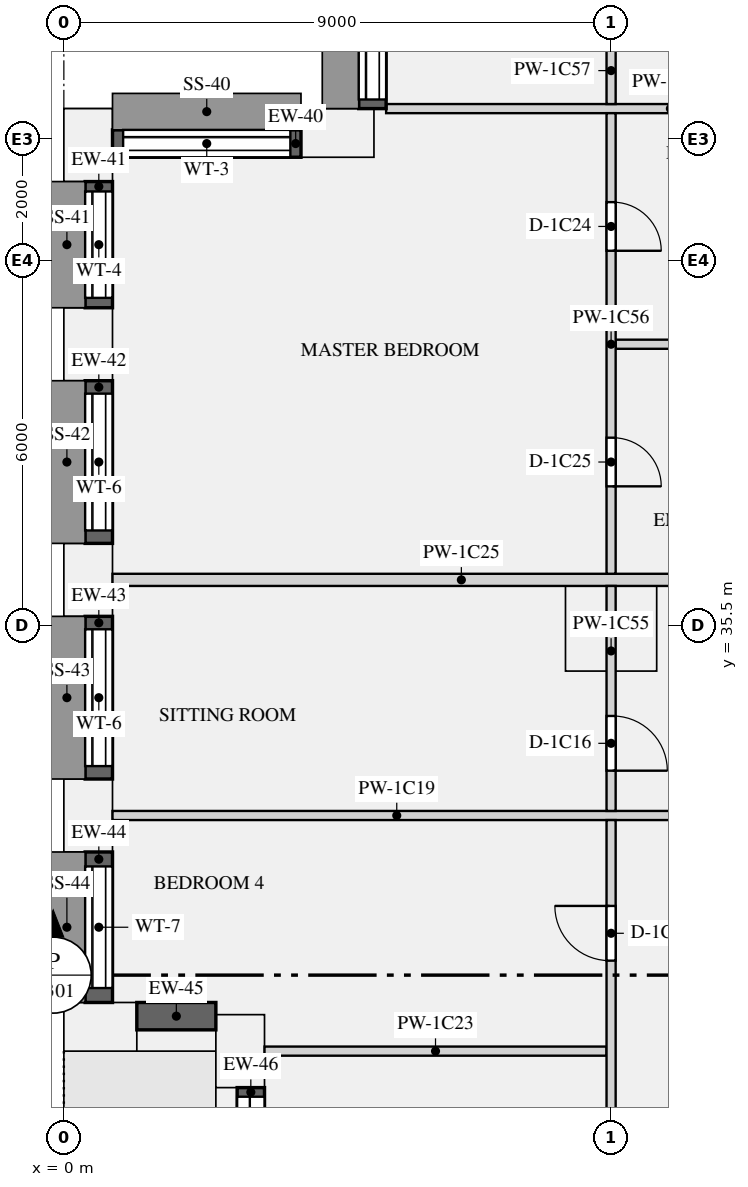
"""IFC4 building model, lengths in metres.
Left out: names, types, materials, properties, quantities, classifications, styles, units other than length and angle.
Written with IfcOpenShell. Run it as: python <this file> out.ifc"""

import sys

from ifc_helpers import new_model, si_unit, direction, frame, frame_2d, origin, origin_2d, place, context, subcontext, project, spatial, rectangle, extrude, element, fill, save


model = new_model("IFC4")
c1 = context("Model", 3, precision=1e-05, world=origin(), true_north=direction((0.0, 1.0)))
c2 = subcontext(c1, "Body", "Model", "MODEL_VIEW")
j1 = project(units=[si_unit("LENGTHUNIT", "METRE"), si_unit("PLANEANGLEUNIT", "RADIAN")], contexts=[c1])
p1 = place(None, origin())
s1 = spatial("IfcSite", under=j1, at=p1, CompositionType="ELEMENT")
p2 = place(p1, origin())
s2 = spatial("IfcBuilding", under=s1, at=p2, CompositionType="ELEMENT")
p3 = place(p2, frame((0.0, 0.0, 38.4)))
s3 = spatial("IfcBuildingStorey", under=s2, at=p3, CompositionType="ELEMENT", Elevation=38.4)
for number, where, z_axis, x_axis in (
    (1, (4.5, 43.6, 0.0), (0.0, 0.0, 1.0), (-1.0, 0.0, 0.0)),
    (2, (0.4, 43.4, 0.0), (0.0, 0.0, 1.0), (0.0, -1.0, 0.0)),
    (3, (0.4, 40.125, 0.0), (0.0, 0.0, 1.0), (0.0, -1.0, 0.0)),
    (4, (0.4, 36.25, 0.0), (0.0, 0.0, 1.0), (0.0, -1.0, 0.0)),
    (5, (0.4, 32.375, 0.0), (0.0, 0.0, 1.0), (0.0, -1.0, 0.0)),
    (6, (0.6, 28.9, 0.0), (0.0, 0.0, 1.0), (1.0, 0.0, 0.0)),
    (7, (2.9, 28.5, 0.0), (0.0, 0.0, 1.0), (0.0, -1.0, 0.0)),
):
    element("IfcColumn", number, at=place(p3, frame(where, z_axis=z_axis, x_axis=x_axis)), inside=s3, PredefinedType="USERDEFINED", context=c2, shape_type="SweptSolid", body=[
        extrude(rectangle(XDim=1.2, YDim=0.8, at=origin_2d()), origin(), (0.0, 0.0, 1.0), 3.15),
    ])
p4 = place(p3, frame((9.0, 35.5, 0.0), z_axis=(0.0, 0.0, 1.0), x_axis=(1.0, 0.0, 0.0)))
e8 = element("IfcColumn", 8, at=p4, inside=s3, PredefinedType="COLUMN", context=c2, shape_type="SweptSolid", body=[
    extrude(rectangle(XDim=1.5, YDim=1.5, at=origin_2d()), origin(), (0.0, 0.0, 1.0), 3.15),
])
p5 = place(p3, frame((5.075, 47.3, 0.9), z_axis=(0.0, 0.0, 1.0), x_axis=(0.0, -1.0, 0.0)))
e9 = element("IfcWall", 9, at=p5, inside=s3, PredefinedType="SOLIDWALL", context=c2, shape_type="SweptSolid", body=[
    extrude(rectangle(XDim=3.3, YDim=0.45, at=frame_2d((1.65, 0.0))), origin(), (0.0, 0.0, 1.0), 1.93),
])
p6 = place(p5, frame((0.15, 0.0, 0.15)))
e10 = element("IfcOpeningElement", 10, at=p6, cuts=e9, PredefinedType="OPENING", context=c2, shape_type="SweptSolid", body=[
    extrude(rectangle(XDim=3.0, YDim=1.5, at=frame_2d((1.5, 0.75))), frame((0.0, 0.235, 0.0), z_axis=(0.0, -1.0, 0.0), x_axis=(1.0, 0.0, 0.0)), (0.0, 0.0, 1.0), 0.47),
])
p7 = place(p3, frame((3.9, 43.425, 0.9), z_axis=(0.0, 0.0, 1.0), x_axis=(-1.0, 0.0, 0.0)))
e11 = element("IfcWall", 11, at=p7, inside=s3, PredefinedType="SOLIDWALL", context=c2, shape_type="SweptSolid", body=[
    extrude(rectangle(XDim=3.1, YDim=0.45, at=frame_2d((1.55, 0.0))), origin(), (0.0, 0.0, 1.0), 1.93),
])
p8 = place(p7, frame((0.175, 0.0, 0.15)))
e12 = element("IfcOpeningElement", 12, at=p8, cuts=e11, PredefinedType="OPENING", context=c2, shape_type="SweptSolid", body=[
    extrude(rectangle(XDim=2.75, YDim=1.5, at=frame_2d((1.375, 0.75))), frame((0.0, 0.235, 0.0), z_axis=(0.0, -1.0, 0.0), x_axis=(1.0, 0.0, 0.0)), (0.0, 0.0, 1.0), 0.47),
])
p9 = place(p3, frame((0.575, 42.8, 0.9), z_axis=(0.0, 0.0, 1.0), x_axis=(0.0, -1.0, 0.0)))
e13 = element("IfcWall", 13, at=p9, inside=s3, PredefinedType="SOLIDWALL", context=c2, shape_type="SweptSolid", body=[
    extrude(rectangle(XDim=2.075, YDim=0.45, at=frame_2d((1.038, 0.0))), origin(), (0.0, 0.0, 1.0), 1.93),
])
p10 = place(p9, frame((0.163, 0.0, 0.15)))
e14 = element("IfcOpeningElement", 14, at=p10, cuts=e13, PredefinedType="OPENING", context=c2, shape_type="SweptSolid", body=[
    extrude(rectangle(XDim=1.75, YDim=1.5, at=frame_2d((0.875, 0.75))), frame((0.0, 0.235, 0.0), z_axis=(0.0, -1.0, 0.0), x_axis=(1.0, 0.0, 0.0)), (0.0, 0.0, 1.0), 0.47),
])
p11 = place(p3, frame((0.575, 39.525, 0.9), z_axis=(0.0, 0.0, 1.0), x_axis=(0.0, -1.0, 0.0)))
e15 = element("IfcWall", 15, at=p11, inside=s3, PredefinedType="SOLIDWALL", context=c2, shape_type="SweptSolid", body=[
    extrude(rectangle(XDim=2.675, YDim=0.45, at=frame_2d((1.337, 0.0))), origin(), (0.0, 0.0, 1.0), 1.93),
])
p12 = place(p11, frame((0.212, 0.0, 0.15)))
e16 = element("IfcOpeningElement", 16, at=p12, cuts=e15, PredefinedType="OPENING", context=c2, shape_type="SweptSolid", body=[
    extrude(rectangle(XDim=2.25, YDim=1.5, at=frame_2d((1.125, 0.75))), frame((0.0, 0.235, 0.0), z_axis=(0.0, -1.0, 0.0), x_axis=(1.0, 0.0, 0.0)), (0.0, 0.0, 1.0), 0.47),
])
p13 = place(p3, frame((0.575, 35.65, 0.9), z_axis=(0.0, 0.0, 1.0), x_axis=(0.0, -1.0, 0.0)))
e17 = element("IfcWall", 17, at=p13, inside=s3, PredefinedType="SOLIDWALL", context=c2, shape_type="SweptSolid", body=[
    extrude(rectangle(XDim=2.675, YDim=0.45, at=frame_2d((1.337, 0.0))), origin(), (0.0, 0.0, 1.0), 1.93),
])
p14 = place(p13, frame((0.212, 0.0, 0.15)))
e18 = element("IfcOpeningElement", 18, at=p14, cuts=e17, PredefinedType="OPENING", context=c2, shape_type="SweptSolid", body=[
    extrude(rectangle(XDim=2.25, YDim=1.5, at=frame_2d((1.125, 0.75))), frame((0.0, 0.235, 0.0), z_axis=(0.0, -1.0, 0.0), x_axis=(1.0, 0.0, 0.0)), (0.0, 0.0, 1.0), 0.47),
])
p15 = place(p3, frame((0.575, 31.775, 0.9), z_axis=(0.0, 0.0, 1.0), x_axis=(0.0, -1.0, 0.0)))
e19 = element("IfcWall", 19, at=p15, inside=s3, PredefinedType="SOLIDWALL", context=c2, shape_type="SweptSolid", body=[
    extrude(rectangle(XDim=2.475, YDim=0.45, at=frame_2d((1.237, 0.0))), origin(), (0.0, 0.0, 1.0), 1.93),
])
p16 = place(p15, frame((0.238, 0.0, 0.15)))
e20 = element("IfcOpeningElement", 20, at=p16, cuts=e19, PredefinedType="OPENING", context=c2, shape_type="SweptSolid", body=[
    extrude(rectangle(XDim=2.0, YDim=1.5, at=frame_2d((1.0, 0.75))), frame((0.0, 0.235, 0.0), z_axis=(0.0, -1.0, 0.0), x_axis=(1.0, 0.0, 0.0)), (0.0, 0.0, 1.0), 0.47),
])
p17 = place(p3, frame((1.2, 29.075, 0.9), z_axis=(0.0, 0.0, 1.0), x_axis=(1.0, 0.0, 0.0)))
e21 = element("IfcWall", 21, at=p17, inside=s3, PredefinedType="SOLIDWALL", context=c2, shape_type="SweptSolid", body=[
    extrude(rectangle(XDim=1.3, YDim=0.45, at=frame_2d((0.65, 0.0))), origin(), (0.0, 0.0, 1.0), 1.93),
])
p18 = place(p3, frame((3.075, 27.9, 0.0), z_axis=(0.0, 0.0, 1.0), x_axis=(0.0, -1.0, 0.0)))
e22 = element("IfcWall", 22, at=p18, inside=s3, PredefinedType="SOLIDWALL", context=c2, shape_type="SweptSolid", body=[
    extrude(rectangle(XDim=2.8, YDim=0.45, at=frame_2d((1.4, 0.0))), origin(), (0.0, 0.0, 1.0), 2.83),
])
p19 = place(p18, frame((0.15, 0.0, 0.0)))
e23 = element("IfcOpeningElement", 23, at=p19, cuts=e22, PredefinedType="OPENING", context=c2, shape_type="SweptSolid", body=[
    extrude(rectangle(XDim=2.5, YDim=2.3, at=frame_2d((1.25, 1.15))), frame((0.0, 0.235, 0.0), z_axis=(0.0, -1.0, 0.0), x_axis=(1.0, 0.0, 0.0)), (0.0, 0.0, 1.0), 0.47),
])
p20 = place(p3, frame((0.8, 32.375, 0.0), z_axis=(0.0, 0.0, 1.0), x_axis=(1.0, 0.0, 0.0)))
e24 = element("IfcWall", 24, at=p20, inside=s3, PredefinedType="PARTITIONING", context=c2, shape_type="SweptSolid", body=[
    extrude(rectangle(XDim=11.4, YDim=0.15, at=frame_2d((5.7, 0.0))), origin(), (0.0, 0.0, 1.0), 2.83),
])
p21 = place(p20, frame((9.35, 0.0, 0.0)))
e25 = element("IfcOpeningElement", 25, at=p21, cuts=e24, PredefinedType="OPENING", context=c2, shape_type="SweptSolid", body=[
    extrude(rectangle(XDim=0.9, YDim=2.1, at=frame_2d((0.45, 1.05))), frame((0.0, 0.085, 0.0), z_axis=(0.0, -1.0, 0.0), x_axis=(1.0, 0.0, 0.0)), (0.0, 0.0, 1.0), 0.17),
])
p22 = place(p3, frame((3.3, 28.5, 0.0), z_axis=(0.0, 0.0, 1.0), x_axis=(1.0, 0.0, 0.0)))
e26 = element("IfcWall", 26, at=p22, inside=s3, PredefinedType="PARTITIONING", context=c2, shape_type="SweptSolid", body=[
    extrude(rectangle(XDim=5.625, YDim=0.15, at=frame_2d((2.812, 0.0))), origin(), (0.0, 0.0, 1.0), 2.83),
])
p23 = place(p3, frame((0.8, 36.25, 0.0), z_axis=(0.0, 0.0, 1.0), x_axis=(1.0, 0.0, 0.0)))
e27 = element("IfcWall", 27, at=p23, inside=s3, PredefinedType="PARTITIONING", context=c2, shape_type="SweptSolid", body=[
    extrude(rectangle(XDim=11.475, YDim=0.2, at=frame_2d((5.737, 0.0))), origin(), (0.0, 0.0, 1.0), 2.83),
])
p24 = place(p3, frame((5.3, 44.0, 0.0), z_axis=(0.0, 0.0, 1.0), x_axis=(1.0, 0.0, 0.0)))
e28 = element("IfcWall", 28, at=p24, inside=s3, PredefinedType="PARTITIONING", context=c2, shape_type="SweptSolid", body=[
    extrude(rectangle(XDim=27.775, YDim=0.15, at=frame_2d((13.887, 0.0))), origin(), (0.0, 0.0, 1.0), 2.83),
])
p25 = place(p24, frame((14.5, 0.0, 0.0)))
e29 = element("IfcOpeningElement", 29, at=p25, cuts=e28, PredefinedType="OPENING", context=c2, shape_type="SweptSolid", body=[
    extrude(rectangle(XDim=0.9, YDim=2.1, at=frame_2d((0.45, 1.05))), frame((0.0, 0.085, 0.0), z_axis=(0.0, -1.0, 0.0), x_axis=(1.0, 0.0, 0.0)), (0.0, 0.0, 1.0), 0.17),
])
p26 = place(p24, frame((19.0, 0.0, 0.0)))
e30 = element("IfcOpeningElement", 30, at=p26, cuts=e28, PredefinedType="OPENING", context=c2, shape_type="SweptSolid", body=[
    extrude(rectangle(XDim=0.9, YDim=2.1, at=frame_2d((0.45, 1.05))), frame((0.0, 0.085, 0.0), z_axis=(0.0, -1.0, 0.0), x_axis=(1.0, 0.0, 0.0)), (0.0, 0.0, 1.0), 0.17),
])
p27 = place(p24, frame((9.35, 0.0, 0.0)))
e31 = element("IfcOpeningElement", 31, at=p27, cuts=e28, PredefinedType="OPENING", context=c2, shape_type="SweptSolid", body=[
    extrude(rectangle(XDim=0.9, YDim=2.1, at=frame_2d((0.45, 1.05))), frame((0.0, 0.085, 0.0), z_axis=(0.0, -1.0, 0.0), x_axis=(1.0, 0.0, 0.0)), (0.0, 0.0, 1.0), 0.17),
])
p28 = place(p24, frame((23.5, 0.0, 0.0)))
e32 = element("IfcOpeningElement", 32, at=p28, cuts=e28, PredefinedType="OPENING", context=c2, shape_type="SweptSolid", body=[
    extrude(rectangle(XDim=0.9, YDim=2.1, at=frame_2d((0.45, 1.05))), frame((0.0, 0.085, 0.0), z_axis=(0.0, -1.0, 0.0), x_axis=(1.0, 0.0, 0.0)), (0.0, 0.0, 1.0), 0.17),
])
p29 = place(p3, frame((9.075, 40.125, 0.0), z_axis=(0.0, 0.0, 1.0), x_axis=(1.0, 0.0, 0.0)))
e33 = element("IfcWall", 33, at=p29, inside=s3, PredefinedType="PARTITIONING", context=c2, shape_type="SweptSolid", body=[
    extrude(rectangle(XDim=3.05, YDim=0.15, at=frame_2d((1.525, 0.0))), origin(), (0.0, 0.0, 1.0), 2.83),
])
p30 = place(p29, frame((1.125, 0.0, 0.0)))
e34 = element("IfcOpeningElement", 34, at=p30, cuts=e33, PredefinedType="OPENING", context=c2, shape_type="SweptSolid", body=[
    extrude(rectangle(XDim=0.8, YDim=2.1, at=frame_2d((0.4, 1.05))), frame((0.0, 0.085, 0.0), z_axis=(0.0, -1.0, 0.0), x_axis=(1.0, 0.0, 0.0)), (0.0, 0.0, 1.0), 0.17),
])
p31 = place(p3, frame((9.0, 20.575, 0.0), z_axis=(0.0, 0.0, 1.0), x_axis=(0.0, 1.0, 0.0)))
e35 = element("IfcWall", 35, at=p31, inside=s3, PredefinedType="PARTITIONING", context=c2, shape_type="SweptSolid", body=[
    extrude(rectangle(XDim=11.725, YDim=0.15, at=frame_2d((5.863, 0.0))), origin(), (0.0, 0.0, 1.0), 2.83),
])
p32 = place(p31, frame((5.6, 0.0, 0.0)))
e36 = element("IfcOpeningElement", 36, at=p32, cuts=e35, PredefinedType="OPENING", context=c2, shape_type="SweptSolid", body=[
    extrude(rectangle(XDim=0.9, YDim=2.1, at=frame_2d((0.45, 1.05))), frame((0.0, 0.085, 0.0), z_axis=(0.0, -1.0, 0.0), x_axis=(1.0, 0.0, 0.0)), (0.0, 0.0, 1.0), 0.17),
])
p33 = place(p31, frame((9.413, 0.0, 0.0)))
e37 = element("IfcOpeningElement", 37, at=p33, cuts=e35, PredefinedType="OPENING", context=c2, shape_type="SweptSolid", body=[
    extrude(rectangle(XDim=0.9, YDim=2.1, at=frame_2d((0.45, 1.05))), frame((0.0, 0.085, 0.0), z_axis=(0.0, -1.0, 0.0), x_axis=(1.0, 0.0, 0.0)), (0.0, 0.0, 1.0), 0.17),
])
p34 = place(p3, frame((9.0, 32.45, 0.0), z_axis=(0.0, 0.0, 1.0), x_axis=(0.0, 1.0, 0.0)))
e38 = element("IfcWall", 38, at=p34, inside=s3, PredefinedType="PARTITIONING", context=c2, shape_type="SweptSolid", body=[
    extrude(rectangle(XDim=3.7, YDim=0.15, at=frame_2d((1.85, 0.0))), origin(), (0.0, 0.0, 1.0), 2.83),
])
p35 = place(p34, frame((0.662, 0.0, 0.0)))
e39 = element("IfcOpeningElement", 39, at=p35, cuts=e38, PredefinedType="OPENING", context=c2, shape_type="SweptSolid", body=[
    extrude(rectangle(XDim=0.9, YDim=2.1, at=frame_2d((0.45, 1.05))), frame((0.0, 0.085, 0.0), z_axis=(0.0, -1.0, 0.0), x_axis=(1.0, 0.0, 0.0)), (0.0, 0.0, 1.0), 0.17),
])
p36 = place(p3, frame((9.0, 36.35, 0.0), z_axis=(0.0, 0.0, 1.0), x_axis=(0.0, 1.0, 0.0)))
e40 = element("IfcWall", 40, at=p36, inside=s3, PredefinedType="PARTITIONING", context=c2, shape_type="SweptSolid", body=[
    extrude(rectangle(XDim=7.575, YDim=0.15, at=frame_2d((3.788, 0.0))), origin(), (0.0, 0.0, 1.0), 2.83),
])
p37 = place(p36, frame((5.312, 0.0, 0.0)))
e41 = element("IfcOpeningElement", 41, at=p37, cuts=e40, PredefinedType="OPENING", context=c2, shape_type="SweptSolid", body=[
    extrude(rectangle(XDim=0.8, YDim=2.1, at=frame_2d((0.4, 1.05))), frame((0.0, 0.085, 0.0), z_axis=(0.0, -1.0, 0.0), x_axis=(1.0, 0.0, 0.0)), (0.0, 0.0, 1.0), 0.17),
])
p38 = place(p36, frame((1.438, 0.0, 0.0)))
e42 = element("IfcOpeningElement", 42, at=p38, cuts=e40, PredefinedType="OPENING", context=c2, shape_type="SweptSolid", body=[
    extrude(rectangle(XDim=0.8, YDim=2.1, at=frame_2d((0.4, 1.05))), frame((0.0, 0.085, 0.0), z_axis=(0.0, -1.0, 0.0), x_axis=(1.0, 0.0, 0.0)), (0.0, 0.0, 1.0), 0.17),
])
p39 = place(p3, frame((9.0, 44.075, 0.0), z_axis=(0.0, 0.0, 1.0), x_axis=(0.0, 1.0, 0.0)))
e43 = element("IfcWall", 43, at=p39, inside=s3, PredefinedType="PARTITIONING", context=c2, shape_type="SweptSolid", body=[
    extrude(rectangle(XDim=3.625, YDim=0.15, at=frame_2d((1.812, 0.0))), origin(), (0.0, 0.0, 1.0), 2.83),
])
p40 = place(p39, frame((1.1, 0.0, 0.0)))
e44 = element("IfcOpeningElement", 44, at=p40, cuts=e43, PredefinedType="OPENING", context=c2, shape_type="SweptSolid", body=[
    extrude(rectangle(XDim=1.5, YDim=2.1, at=frame_2d((0.75, 1.05))), frame((0.0, 0.085, 0.0), z_axis=(0.0, -1.0, 0.0), x_axis=(1.0, 0.0, 0.0)), (0.0, 0.0, 1.0), 0.17),
])
p41 = place(p6, origin())
e45 = element("IfcWindow", 45, at=p41, inside=s3, PartitioningType="SINGLE_PANEL", PredefinedType="WINDOW", context=c2, shape_type="SweptSolid", body=[
    extrude(rectangle(XDim=3.0, YDim=1.5, at=frame_2d((1.5, 0.75))), frame((0.0, -0.065, 0.0), z_axis=(0.0, -1.0, 0.0), x_axis=(1.0, 0.0, 0.0)), (0.0, 0.0, 1.0), 0.06),
])
fill(e10, e45)
p42 = place(p8, origin())
e46 = element("IfcWindow", 46, at=p42, inside=s3, PartitioningType="SINGLE_PANEL", PredefinedType="WINDOW", context=c2, shape_type="SweptSolid", body=[
    extrude(rectangle(XDim=2.75, YDim=1.5, at=frame_2d((1.375, 0.75))), frame((0.0, -0.065, 0.0), z_axis=(0.0, -1.0, 0.0), x_axis=(1.0, 0.0, 0.0)), (0.0, 0.0, 1.0), 0.06),
])
fill(e12, e46)
p43 = place(p10, origin())
e47 = element("IfcWindow", 47, at=p43, inside=s3, PartitioningType="SINGLE_PANEL", PredefinedType="WINDOW", context=c2, shape_type="SweptSolid", body=[
    extrude(rectangle(XDim=1.75, YDim=1.5, at=frame_2d((0.875, 0.75))), frame((0.0, -0.065, 0.0), z_axis=(0.0, -1.0, 0.0), x_axis=(1.0, 0.0, 0.0)), (0.0, 0.0, 1.0), 0.06),
])
fill(e14, e47)
p44 = place(p12, origin())
e48 = element("IfcWindow", 48, at=p44, inside=s3, PartitioningType="SINGLE_PANEL", PredefinedType="WINDOW", context=c2, shape_type="SweptSolid", body=[
    extrude(rectangle(XDim=2.25, YDim=1.5, at=frame_2d((1.125, 0.75))), frame((0.0, -0.065, 0.0), z_axis=(0.0, -1.0, 0.0), x_axis=(1.0, 0.0, 0.0)), (0.0, 0.0, 1.0), 0.06),
])
fill(e16, e48)
p45 = place(p14, origin())
e49 = element("IfcWindow", 49, at=p45, inside=s3, PartitioningType="SINGLE_PANEL", PredefinedType="WINDOW", context=c2, shape_type="SweptSolid", body=[
    extrude(rectangle(XDim=2.25, YDim=1.5, at=frame_2d((1.125, 0.75))), frame((0.0, -0.065, 0.0), z_axis=(0.0, -1.0, 0.0), x_axis=(1.0, 0.0, 0.0)), (0.0, 0.0, 1.0), 0.06),
])
fill(e18, e49)
p46 = place(p16, origin())
e50 = element("IfcWindow", 50, at=p46, inside=s3, PartitioningType="SINGLE_PANEL", PredefinedType="WINDOW", context=c2, shape_type="SweptSolid", body=[
    extrude(rectangle(XDim=2.0, YDim=1.5, at=frame_2d((1.0, 0.75))), frame((0.0, -0.065, 0.0), z_axis=(0.0, -1.0, 0.0), x_axis=(1.0, 0.0, 0.0)), (0.0, 0.0, 1.0), 0.06),
])
fill(e20, e50)
p47 = place(p19, origin())
e51 = element("IfcDoor", 51, at=p47, inside=s3, OperationType="SLIDING_TO_LEFT", PredefinedType="DOOR", context=c2, shape_type="SweptSolid", body=[
    extrude(rectangle(XDim=2.5, YDim=2.3, at=frame_2d((1.25, 1.15))), frame((0.0, -0.07, 0.0), z_axis=(0.0, -1.0, 0.0), x_axis=(1.0, 0.0, 0.0)), (0.0, 0.0, 1.0), 0.05),
])
fill(e23, e51)
p48 = place(p33, origin())
e52 = element("IfcDoor", 52, at=p48, inside=s3, OperationType="SINGLE_SWING_RIGHT", PredefinedType="DOOR", context=c2, shape_type="SweptSolid", body=[
    extrude(rectangle(XDim=0.9, YDim=2.1, at=frame_2d((0.45, 1.05))), frame((0.0, 0.025, 0.0), z_axis=(0.0, -1.0, 0.0), x_axis=(1.0, 0.0, 0.0)), (0.0, 0.0, 1.0), 0.05),
])
fill(e37, e52)
p49 = place(p35, frame((0.9, 0.0, 0.0), z_axis=(0.0, 0.0, 1.0), x_axis=(-1.0, 0.0, 0.0)))
e53 = element("IfcDoor", 53, at=p49, inside=s3, OperationType="SINGLE_SWING_RIGHT", PredefinedType="DOOR", context=c2, shape_type="SweptSolid", body=[
    extrude(rectangle(XDim=0.9, YDim=2.1, at=frame_2d((0.45, 1.05))), frame((0.0, 0.025, 0.0), z_axis=(0.0, -1.0, 0.0), x_axis=(1.0, 0.0, 0.0)), (0.0, 0.0, 1.0), 0.05),
])
fill(e39, e53)
p50 = place(p37, frame((0.8, 0.0, 0.0), z_axis=(0.0, 0.0, 1.0), x_axis=(-1.0, 0.0, 0.0)))
e54 = element("IfcDoor", 54, at=p50, inside=s3, OperationType="SINGLE_SWING_RIGHT", PredefinedType="DOOR", context=c2, shape_type="SweptSolid", body=[
    extrude(rectangle(XDim=0.8, YDim=2.1, at=frame_2d((0.4, 1.05))), frame((0.0, 0.025, 0.0), z_axis=(0.0, -1.0, 0.0), x_axis=(1.0, 0.0, 0.0)), (0.0, 0.0, 1.0), 0.05),
])
fill(e41, e54)
p51 = place(p38, frame((0.8, 0.0, 0.0), z_axis=(0.0, 0.0, 1.0), x_axis=(-1.0, 0.0, 0.0)))
e55 = element("IfcDoor", 55, at=p51, inside=s3, OperationType="SINGLE_SWING_RIGHT", PredefinedType="DOOR", context=c2, shape_type="SweptSolid", body=[
    extrude(rectangle(XDim=0.8, YDim=2.1, at=frame_2d((0.4, 1.05))), frame((0.0, 0.025, 0.0), z_axis=(0.0, -1.0, 0.0), x_axis=(1.0, 0.0, 0.0)), (0.0, 0.0, 1.0), 0.05),
])
fill(e42, e55)
save(model, sys.argv[1])
